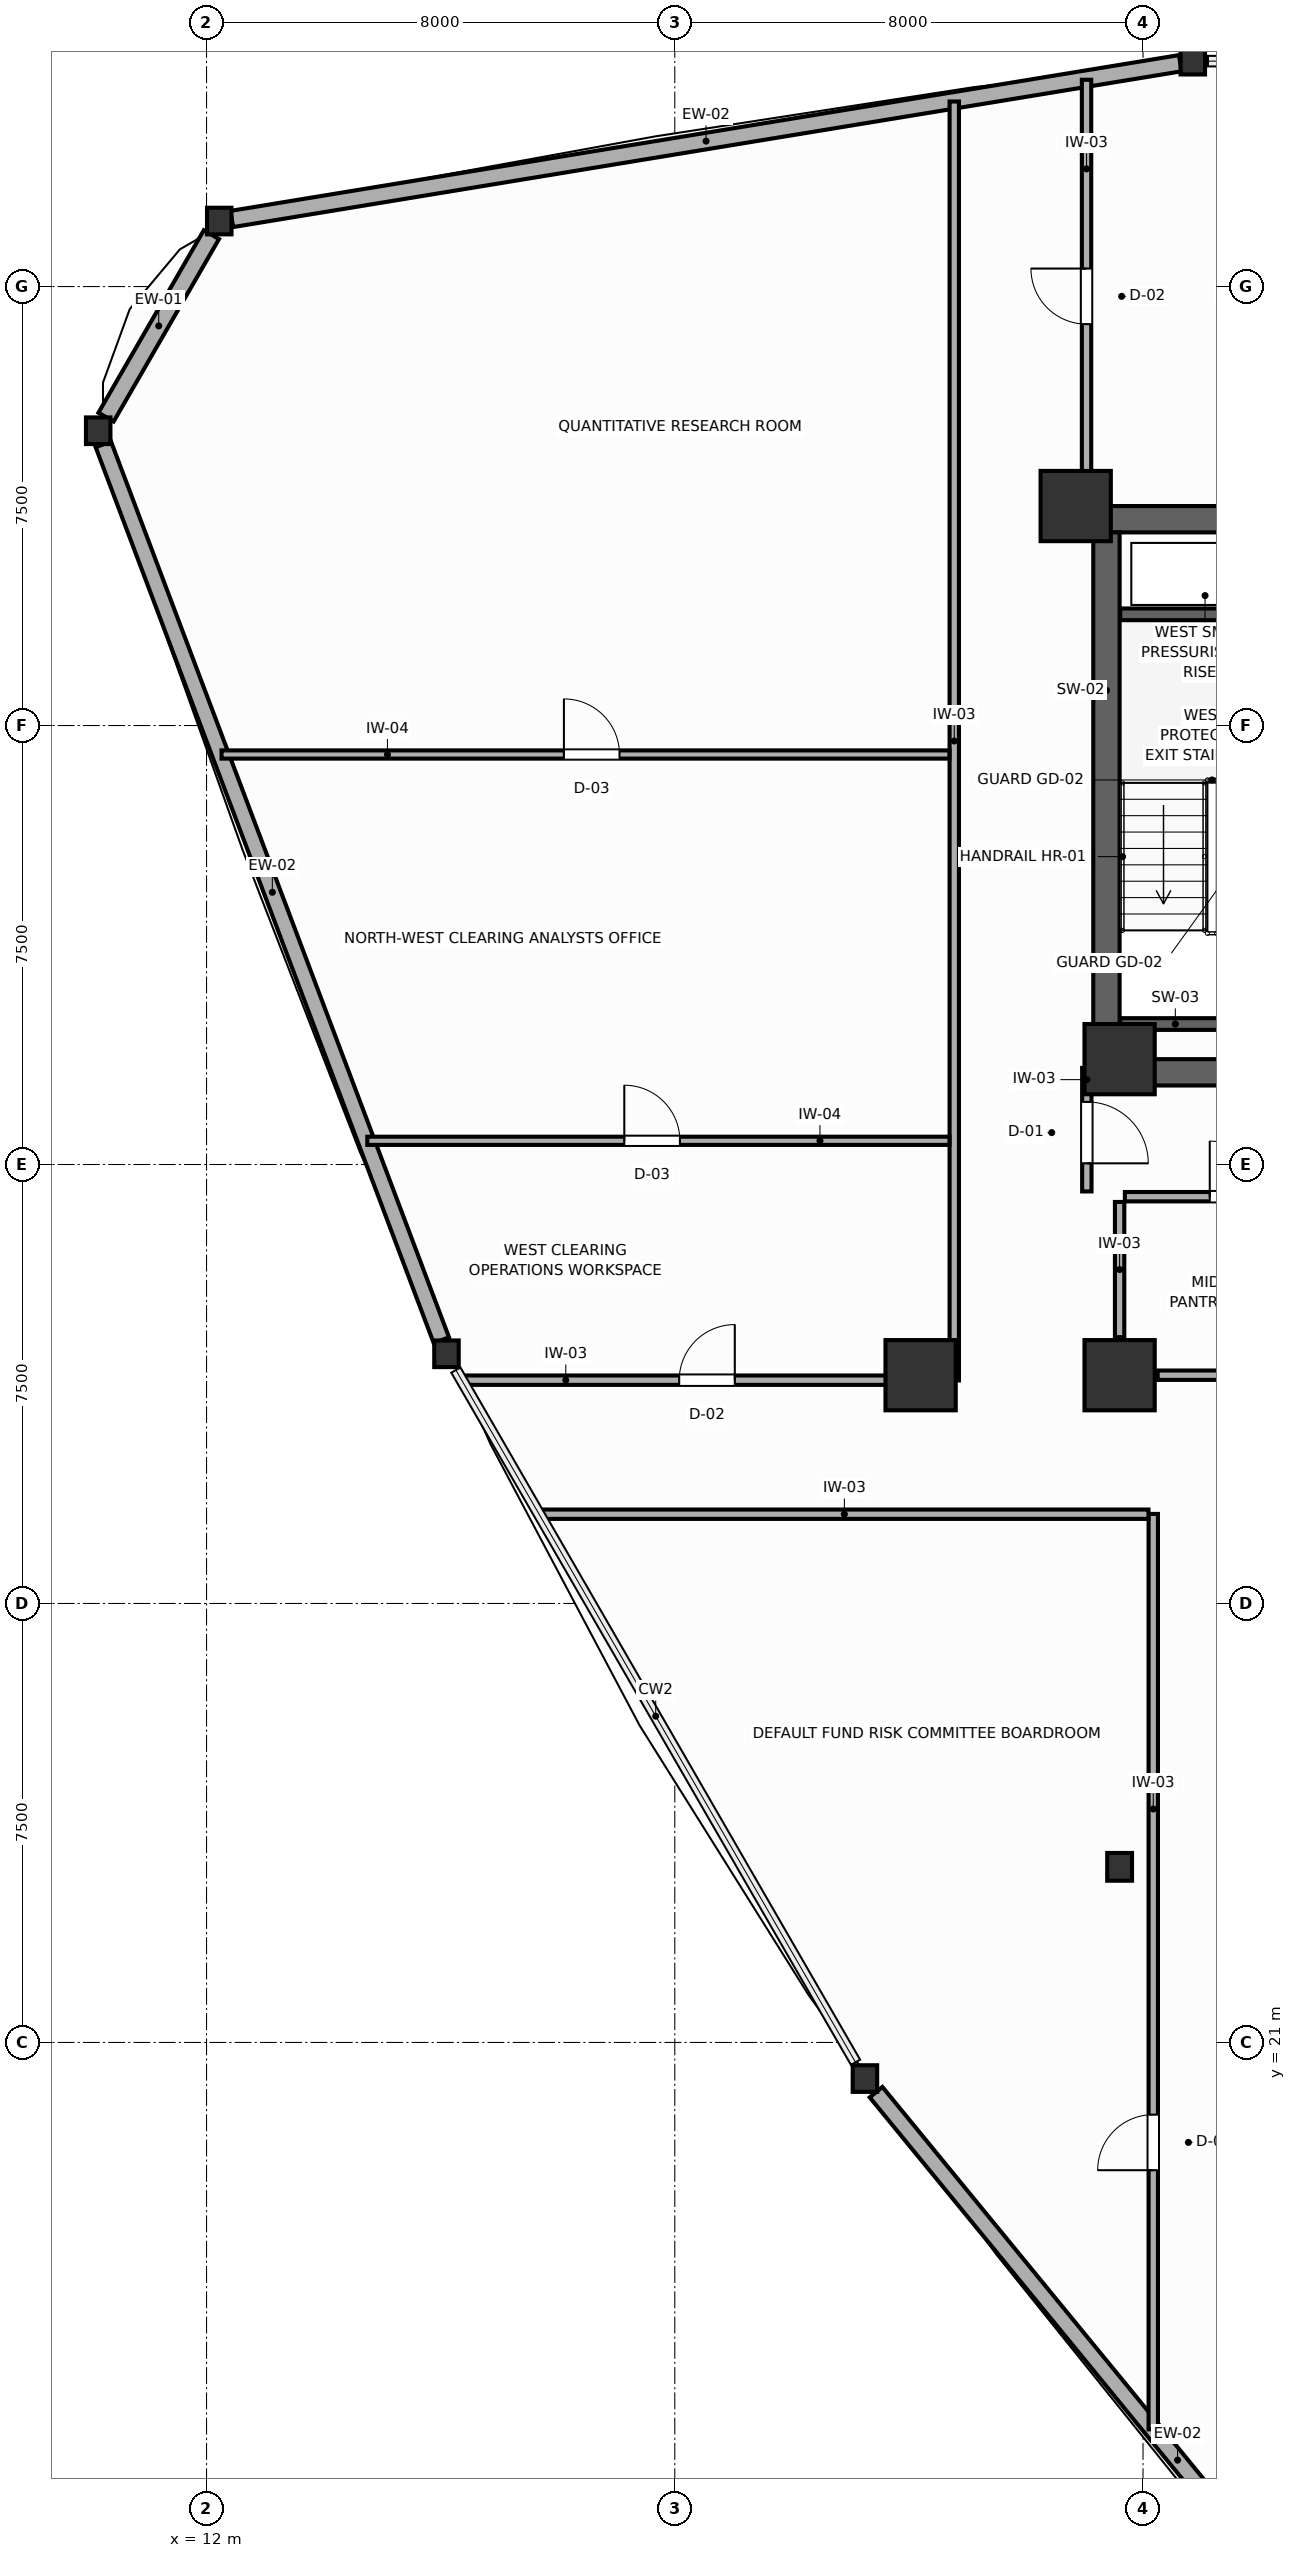
"""IFC4 building model, lengths in metres.
Left out: names, types, materials, properties, quantities, classifications, styles, units other than length and angle.
Written with IfcOpenShell. Run it as: python <this file> out.ifc"""

import sys

from ifc_helpers import new_model, si_unit, direction, frame, frame_2d, origin, origin_2d, place, context, subcontext, project, spatial, rectangle, i_section, extrude, source, transform, mapped, element, fill, save


model = new_model("IFC4")
c1 = context("Model", 3, precision=1e-05, world=origin(), true_north=direction((0.0, 1.0)))
c2 = subcontext(c1, "Body", "Model", "MODEL_VIEW")
j1 = project(units=[si_unit("LENGTHUNIT", "METRE"), si_unit("PLANEANGLEUNIT", "RADIAN")], contexts=[c1])
p1 = place(None, origin())
s1 = spatial("IfcSite", under=j1, at=p1, CompositionType="ELEMENT")
p2 = place(p1, origin())
s2 = spatial("IfcBuilding", under=s1, at=p2, CompositionType="ELEMENT")
p3 = place(p2, frame((0.0, 0.0, 106.2)))
s3 = spatial("IfcBuildingStorey", under=s2, at=p3, CompositionType="ELEMENT", Elevation=106.2)
p4 = place(p3, frame((27.15, 47.025, 0.0), z_axis=(0.0, 0.0, 1.0), x_axis=(1.0, 0.0, 0.0)))
e1 = element("IfcWall", 1, at=p4, inside=s3, PredefinedType="SHEAR", context=c2, shape_type="SweptSolid", body=[
    extrude(rectangle(XDim=17.7, YDim=0.45, at=frame_2d((8.85, 0.0))), origin(), (0.0, 0.0, 1.0), 3.6),
])
p5 = place(p3, frame((27.15, 37.575, 0.0), z_axis=(0.0, 0.0, 1.0), x_axis=(1.0, 0.0, 0.0)))
e2 = element("IfcWall", 2, at=p5, inside=s3, PredefinedType="SHEAR", context=c2, shape_type="SweptSolid", body=[
    extrude(rectangle(XDim=17.7, YDim=0.45, at=frame_2d((8.85, 0.0))), origin(), (0.0, 0.0, 1.0), 3.6),
])
p6 = place(p5, frame((4.875, 0.0, 0.0)))
e3 = element("IfcOpeningElement", 3, at=p6, cuts=e2, PredefinedType="OPENING", context=c2, shape_type="SweptSolid", body=[
    extrude(rectangle(XDim=1.05, YDim=2.1, at=frame_2d((0.525, 1.05))), frame((0.0, 0.235, 0.0), z_axis=(0.0, -1.0, 0.0), x_axis=(1.0, 0.0, 0.0)), (0.0, 0.0, 1.0), 0.47),
])
p7 = place(p5, frame((11.775, 0.0, 0.0)))
e4 = element("IfcOpeningElement", 4, at=p7, cuts=e2, PredefinedType="OPENING", context=c2, shape_type="SweptSolid", body=[
    extrude(rectangle(XDim=1.05, YDim=2.1, at=frame_2d((0.525, 1.05))), frame((0.0, 0.235, 0.0), z_axis=(0.0, -1.0, 0.0), x_axis=(1.0, 0.0, 0.0)), (0.0, 0.0, 1.0), 0.47),
])
p8 = place(p3, frame((27.375, 37.8, 0.0), z_axis=(0.0, 0.0, 1.0), x_axis=(0.0, 1.0, 0.0)))
e5 = element("IfcWall", 5, at=p8, inside=s3, PredefinedType="SHEAR", context=c2, shape_type="SweptSolid", body=[
    extrude(rectangle(XDim=9.0, YDim=0.45, at=frame_2d((4.5, 0.0))), origin(), (0.0, 0.0, 1.0), 3.6),
])
m1 = source(origin(), c2, "Body", "SweptSolid", [
    extrude(rectangle(XDim=1.2, YDim=1.2, at=origin_2d()), origin(), (0.0, 0.0, 1.0), 3.6),
])
for number, where, z_axis, x_axis in (
    (6, (26.85, 47.25, 0.0), (0.0, 0.0, 1.0), (1.0, 0.0, 0.0)),
    (7, (27.6, 37.8, 0.0), (0.0, 0.0, 1.0), (1.0, 0.0, 0.0)),
    (8, (27.6, 32.4, 0.0), (0.0, 0.0, 1.0), (1.0, 0.0, 0.0)),
    (9, (24.2, 32.4, 0.0), (0.0, 0.0, 1.0), (1.0, 0.0, 0.0)),
):
    element("IfcColumn", number, at=place(p3, frame(where, z_axis=z_axis, x_axis=x_axis)), inside=s3, PredefinedType="COLUMN", context=c2, shape_type="MappedRepresentation", body=[
        mapped(m1, transform((0.0, 0.0, 0.0), scale=1.0)),
    ])
m2 = source(origin(), c2, "Body", "SweptSolid", [
    extrude(i_section(OverallWidth=0.424, OverallDepth=0.474, WebThickness=0.045, FlangeThickness=0.072, FilletRadius=0.015, at=origin_2d()), origin(), (0.0, 0.0, 1.0), 3.6),
])
p9 = place(p3, frame((27.6, 24.0, 0.0), z_axis=(0.0, 0.0, 1.0), x_axis=(1.0, 0.0, 0.0)))
e10 = element("IfcColumn", 10, at=p9, inside=s3, PredefinedType="COLUMN", context=c2, shape_type="MappedRepresentation", body=[
    mapped(m2, transform((0.0, 0.0, 0.0), scale=1.0)),
])
m3 = source(origin(), c2, "Body", "SweptSolid", [
    extrude(i_section(OverallWidth=0.418, OverallDepth=0.455, WebThickness=0.039, FlangeThickness=0.063, FilletRadius=0.015, at=origin_2d()), origin(), (0.0, 0.0, 1.0), 3.6),
])
for number, where, z_axis, x_axis in (
    (11, (28.851, 54.852, 0.0), (0.0, 0.0, 1.0), (1.0, 0.0, 0.0)),
    (12, (12.217, 52.119, 0.0), (0.0, 0.0, 1.0), (1.0, 0.0, 0.0)),
    (13, (10.149, 48.537, 0.0), (0.0, 0.0, 1.0), (1.0, 0.0, 0.0)),
    (14, (16.099, 32.766, 0.0), (0.0, 0.0, 1.0), (1.0, 0.0, 0.0)),
    (15, (23.249, 20.383, 0.0), (0.0, 0.0, 1.0), (1.0, 0.0, 0.0)),
):
    element("IfcColumn", number, at=place(p3, frame(where, z_axis=z_axis, x_axis=x_axis)), inside=s3, PredefinedType="COLUMN", context=c2, shape_type="MappedRepresentation", body=[
        mapped(m3, transform((0.0, 0.0, 0.0), scale=1.0)),
    ])
p10 = place(p3, frame((28.637, 54.816, 0.0), z_axis=(0.0, 0.0, 1.0), x_axis=(-0.986776921995, -0.162084256539, 0.0)))
e16 = element("IfcWall", 16, at=p10, inside=s3, PredefinedType="SOLIDWALL", context=c2, shape_type="SweptSolid", body=[
    extrude(rectangle(XDim=16.423, YDim=0.28, at=frame_2d((8.211, 0.0))), origin(), (0.0, 0.0, 1.0), 1.87),
])
p11 = place(p3, frame((12.083, 51.887, 0.0), z_axis=(0.0, 0.0, 1.0), x_axis=(-0.500012057535, -0.866018442252, 0.0)))
e17 = element("IfcWall", 17, at=p11, inside=s3, PredefinedType="SOLIDWALL", context=c2, shape_type="SweptSolid", body=[
    extrude(rectangle(XDim=3.6, YDim=0.3, at=frame_2d((1.8, 0.0))), origin(), (0.0, 0.0, 1.0), 1.87),
])
p12 = place(p3, frame((10.237, 48.304, 0.0), z_axis=(0.0, 0.0, 1.0), x_axis=(0.353021512356, -0.935615204993, 0.0)))
e18 = element("IfcWall", 18, at=p12, inside=s3, PredefinedType="SOLIDWALL", context=c2, shape_type="SweptSolid", body=[
    extrude(rectangle(XDim=16.359, YDim=0.28, at=frame_2d((8.18, 0.0))), origin(), (0.0, 0.0, 1.0), 1.87),
])
p13 = place(p3, frame((23.439, 20.15, 0.0), z_axis=(0.0, 0.0, 1.0), x_axis=(0.633768446385, -0.773522822137, 0.0)))
e19 = element("IfcWall", 19, at=p13, inside=s3, PredefinedType="SOLIDWALL", context=c2, shape_type="SweptSolid", body=[
    extrude(rectangle(XDim=16.255, YDim=0.28, at=frame_2d((8.127, 0.0))), origin(), (0.0, 0.0, 1.0), 1.87),
])
for number, where, z_axis, x_axis in (
    (20, (27.61, 45.4, 0.0), (0.0, 0.0, 1.0), (1.0, 0.0, 0.0)),
    (21, (27.61, 38.4, 0.0), (0.0, 0.0, 1.0), (1.0, 0.0, 0.0)),
):
    element("IfcWall", number, at=place(p3, frame(where, z_axis=z_axis, x_axis=x_axis)), inside=s3, PredefinedType="SHEAR", context=c2, shape_type="SweptSolid", body=[
        extrude(rectangle(XDim=3.14, YDim=0.2, at=frame_2d((1.57, 0.0))), origin(), (0.0, 0.0, 1.0), 3.6),
    ])
p14 = place(p3, frame((28.25, 32.4, 0.0), z_axis=(0.0, 0.0, 1.0), x_axis=(1.0, 0.0, 0.0)))
e22 = element("IfcWall", 22, at=p14, inside=s3, PredefinedType="PARTITIONING", context=c2, shape_type="SweptSolid", body=[
    extrude(rectangle(XDim=3.45, YDim=0.16, at=frame_2d((1.725, 0.0))), origin(), (0.0, 0.0, 1.0), 2.16),
])
p15 = place(p3, frame((27.6, 33.05, 0.0), z_axis=(0.0, 0.0, 1.0), x_axis=(0.0, 1.0, 0.0)))
e23 = element("IfcWall", 23, at=p15, inside=s3, PredefinedType="PARTITIONING", context=c2, shape_type="SweptSolid", body=[
    extrude(rectangle(XDim=2.31, YDim=0.16, at=frame_2d((1.155, 0.0))), origin(), (0.0, 0.0, 1.0), 3.4),
])
p16 = place(p3, frame((27.69, 35.45, 0.0), z_axis=(0.0, 0.0, 1.0), x_axis=(1.0, 0.0, 0.0)))
e24 = element("IfcWall", 24, at=p16, inside=s3, PredefinedType="PARTITIONING", context=c2, shape_type="SweptSolid", body=[
    extrude(rectangle(XDim=4.01, YDim=0.16, at=frame_2d((2.005, 0.0))), origin(), (0.0, 0.0, 1.0), 3.4),
])
p17 = place(p16, frame((1.45, 0.0, 0.0)))
e25 = element("IfcOpeningElement", 25, at=p17, cuts=e24, PredefinedType="OPENING", context=c2, shape_type="SweptSolid", body=[
    extrude(rectangle(XDim=0.95, YDim=2.05, at=frame_2d((0.475, 1.025))), frame((0.0, 0.09, 0.0), z_axis=(0.0, -1.0, 0.0), x_axis=(1.0, 0.0, 0.0)), (0.0, 0.0, 1.0), 0.18),
])
p18 = place(p3, frame((27.04, 35.54, 0.0), z_axis=(0.0, 0.0, 1.0), x_axis=(0.0, 1.0, 0.0)))
e26 = element("IfcWall", 26, at=p18, inside=s3, PredefinedType="PARTITIONING", context=c2, shape_type="SweptSolid", body=[
    extrude(rectangle(XDim=2.11, YDim=0.16, at=frame_2d((1.055, 0.0))), origin(), (0.0, 0.0, 1.0), 3.4),
])
p19 = place(p18, frame((0.48, 0.0, 0.0)))
e27 = element("IfcOpeningElement", 27, at=p19, cuts=e26, PredefinedType="OPENING", context=c2, shape_type="SweptSolid", body=[
    extrude(rectangle(XDim=1.05, YDim=2.1, at=frame_2d((0.525, 1.05))), frame((0.0, 0.09, 0.0), z_axis=(0.0, -1.0, 0.0), x_axis=(1.0, 0.0, 0.0)), (0.0, 0.0, 1.0), 0.18),
])
p20 = place(p3, frame((24.775, 32.31, 0.0), z_axis=(0.0, 0.0, 1.0), x_axis=(0.0, 1.0, 0.0)))
e28 = element("IfcWall", 28, at=p20, inside=s3, PredefinedType="PARTITIONING", context=c2, shape_type="SweptSolid", body=[
    extrude(rectangle(XDim=21.852, YDim=0.16, at=frame_2d((10.926, 0.0))), origin(), (0.0, 0.0, 1.0), 3.4),
])
p21 = place(p3, frame((28.175, 14.39, 0.0), z_axis=(0.0, 0.0, 1.0), x_axis=(0.0, 1.0, 0.0)))
e29 = element("IfcWall", 29, at=p21, inside=s3, PredefinedType="PARTITIONING", context=c2, shape_type="SweptSolid", body=[
    extrude(rectangle(XDim=15.64, YDim=0.16, at=frame_2d((7.82, 0.0))), origin(), (0.0, 0.0, 1.0), 3.4),
])
p22 = place(p21, frame((4.427, 0.0, 0.0)))
e30 = element("IfcOpeningElement", 30, at=p22, cuts=e29, PredefinedType="OPENING", context=c2, shape_type="SweptSolid", body=[
    extrude(rectangle(XDim=0.95, YDim=2.05, at=frame_2d((0.475, 1.025))), frame((0.0, 0.09, 0.0), z_axis=(0.0, -1.0, 0.0), x_axis=(1.0, 0.0, 0.0)), (0.0, 0.0, 1.0), 0.18),
])
p23 = place(p3, frame((17.702, 30.025, 0.0), z_axis=(0.0, 0.0, 1.0), x_axis=(1.0, 0.0, 0.0)))
e31 = element("IfcWall", 31, at=p23, inside=s3, PredefinedType="PARTITIONING", context=c2, shape_type="SweptSolid", body=[
    extrude(rectangle(XDim=10.391, YDim=0.16, at=frame_2d((5.196, 0.0))), origin(), (0.0, 0.0, 1.0), 3.4),
])
p24 = place(p3, frame((16.38, 32.315, 0.0), z_axis=(0.0, 0.0, 1.0), x_axis=(1.0, 0.0, 0.0)))
e32 = element("IfcWall", 32, at=p24, inside=s3, PredefinedType="PARTITIONING", context=c2, shape_type="SweptSolid", body=[
    extrude(rectangle(XDim=8.313, YDim=0.16, at=frame_2d((4.157, 0.0))), origin(), (0.0, 0.0, 1.0), 2.16),
])
p25 = place(p24, frame((3.696, 0.0, 0.0)))
e33 = element("IfcOpeningElement", 33, at=p25, cuts=e32, PredefinedType="OPENING", context=c2, shape_type="SweptSolid", body=[
    extrude(rectangle(XDim=0.95, YDim=2.05, at=frame_2d((0.475, 1.025))), frame((0.0, 0.09, 0.0), z_axis=(0.0, -1.0, 0.0), x_axis=(1.0, 0.0, 0.0)), (0.0, 0.0, 1.0), 0.18),
])
p26 = place(p3, frame((27.035, 47.34, 0.0), z_axis=(0.0, 0.0, 1.0), x_axis=(0.0, 1.0, 0.0)))
e34 = element("IfcWall", 34, at=p26, inside=s3, PredefinedType="PARTITIONING", context=c2, shape_type="SweptSolid", body=[
    extrude(rectangle(XDim=7.193, YDim=0.16, at=frame_2d((3.597, 0.0))), origin(), (0.0, 0.0, 1.0), 2.16),
])
p27 = place(p26, frame((3.018, 0.0, 0.0)))
e35 = element("IfcOpeningElement", 35, at=p27, cuts=e34, PredefinedType="OPENING", context=c2, shape_type="SweptSolid", body=[
    extrude(rectangle(XDim=0.95, YDim=2.05, at=frame_2d((0.475, 1.025))), frame((0.0, 0.09, 0.0), z_axis=(0.0, -1.0, 0.0), x_axis=(1.0, 0.0, 0.0)), (0.0, 0.0, 1.0), 0.18),
])
p28 = place(p3, frame((12.256, 43.005, 0.0), z_axis=(0.0, 0.0, 1.0), x_axis=(1.0, 0.0, 0.0)))
e36 = element("IfcWall", 36, at=p28, inside=s3, PredefinedType="PARTITIONING", context=c2, shape_type="SweptSolid", body=[
    extrude(rectangle(XDim=12.437, YDim=0.14, at=frame_2d((6.219, 0.0))), origin(), (0.0, 0.0, 1.0), 3.4),
])
p29 = place(p28, frame((5.85, 0.0, 0.0)))
e37 = element("IfcOpeningElement", 37, at=p29, cuts=e36, PredefinedType="OPENING", context=c2, shape_type="SweptSolid", body=[
    extrude(rectangle(XDim=0.95, YDim=2.05, at=frame_2d((0.475, 1.025))), frame((0.0, 0.08, 0.0), z_axis=(0.0, -1.0, 0.0), x_axis=(1.0, 0.0, 0.0)), (0.0, 0.0, 1.0), 0.16),
])
p30 = place(p3, frame((14.746, 36.405, 0.0), z_axis=(0.0, 0.0, 1.0), x_axis=(1.0, 0.0, 0.0)))
e38 = element("IfcWall", 38, at=p30, inside=s3, PredefinedType="PARTITIONING", context=c2, shape_type="SweptSolid", body=[
    extrude(rectangle(XDim=9.947, YDim=0.14, at=frame_2d((4.973, 0.0))), origin(), (0.0, 0.0, 1.0), 3.4),
])
p31 = place(p30, frame((4.391, 0.0, 0.0)))
e39 = element("IfcOpeningElement", 39, at=p31, cuts=e38, PredefinedType="OPENING", context=c2, shape_type="SweptSolid", body=[
    extrude(rectangle(XDim=0.95, YDim=2.05, at=frame_2d((0.475, 1.025))), frame((0.0, 0.08, 0.0), z_axis=(0.0, -1.0, 0.0), x_axis=(1.0, 0.0, 0.0)), (0.0, 0.0, 1.0), 0.16),
])
p32 = place(p17, origin())
e40 = element("IfcDoor", 40, at=p32, inside=s3, OperationType="SINGLE_SWING_LEFT", PredefinedType="DOOR", context=c2, shape_type="SweptSolid", body=[
    extrude(rectangle(XDim=0.95, YDim=2.05, at=frame_2d((0.475, 1.025))), frame((0.0, 0.025, 0.0), z_axis=(0.0, -1.0, 0.0), x_axis=(1.0, 0.0, 0.0)), (0.0, 0.0, 1.0), 0.05),
])
fill(e25, e40)
p33 = place(p19, frame((1.05, 0.0, 0.0), z_axis=(0.0, 0.0, 1.0), x_axis=(-1.0, 0.0, 0.0)))
e41 = element("IfcDoor", 41, at=p33, inside=s3, OperationType="SINGLE_SWING_RIGHT", PredefinedType="DOOR", context=c2, shape_type="SweptSolid", body=[
    extrude(rectangle(XDim=1.05, YDim=2.1, at=frame_2d((0.525, 1.05))), frame((0.0, 0.025, 0.0), z_axis=(0.0, -1.0, 0.0), x_axis=(1.0, 0.0, 0.0)), (0.0, 0.0, 1.0), 0.05),
])
fill(e27, e41)
p34 = place(p22, origin())
e42 = element("IfcDoor", 42, at=p34, inside=s3, OperationType="SINGLE_SWING_LEFT", PredefinedType="DOOR", context=c2, shape_type="SweptSolid", body=[
    extrude(rectangle(XDim=0.95, YDim=2.05, at=frame_2d((0.475, 1.025))), frame((0.0, 0.025, 0.0), z_axis=(0.0, -1.0, 0.0), x_axis=(1.0, 0.0, 0.0)), (0.0, 0.0, 1.0), 0.05),
])
fill(e30, e42)
p35 = place(p25, origin())
e43 = element("IfcDoor", 43, at=p35, inside=s3, OperationType="SINGLE_SWING_RIGHT", PredefinedType="DOOR", context=c2, shape_type="SweptSolid", body=[
    extrude(rectangle(XDim=0.95, YDim=2.05, at=frame_2d((0.475, 1.025))), frame((0.0, 0.025, 0.0), z_axis=(0.0, -1.0, 0.0), x_axis=(1.0, 0.0, 0.0)), (0.0, 0.0, 1.0), 0.05),
])
fill(e33, e43)
p36 = place(p27, origin())
e44 = element("IfcDoor", 44, at=p36, inside=s3, OperationType="SINGLE_SWING_RIGHT", PredefinedType="DOOR", context=c2, shape_type="SweptSolid", body=[
    extrude(rectangle(XDim=0.95, YDim=2.05, at=frame_2d((0.475, 1.025))), frame((0.0, 0.025, 0.0), z_axis=(0.0, -1.0, 0.0), x_axis=(1.0, 0.0, 0.0)), (0.0, 0.0, 1.0), 0.05),
])
fill(e35, e44)
p37 = place(p29, origin())
e45 = element("IfcDoor", 45, at=p37, inside=s3, OperationType="SINGLE_SWING_LEFT", PredefinedType="DOOR", context=c2, shape_type="SweptSolid", body=[
    extrude(rectangle(XDim=0.95, YDim=2.05, at=frame_2d((0.475, 1.025))), frame((0.0, 0.025, 0.0), z_axis=(0.0, -1.0, 0.0), x_axis=(1.0, 0.0, 0.0)), (0.0, 0.0, 1.0), 0.05),
])
fill(e37, e45)
p38 = place(p31, origin())
e46 = element("IfcDoor", 46, at=p38, inside=s3, OperationType="SINGLE_SWING_LEFT", PredefinedType="DOOR", context=c2, shape_type="SweptSolid", body=[
    extrude(rectangle(XDim=0.95, YDim=2.05, at=frame_2d((0.475, 1.025))), frame((0.0, 0.025, 0.0), z_axis=(0.0, -1.0, 0.0), x_axis=(1.0, 0.0, 0.0)), (0.0, 0.0, 1.0), 0.05),
])
fill(e39, e46)
save(model, sys.argv[1])
